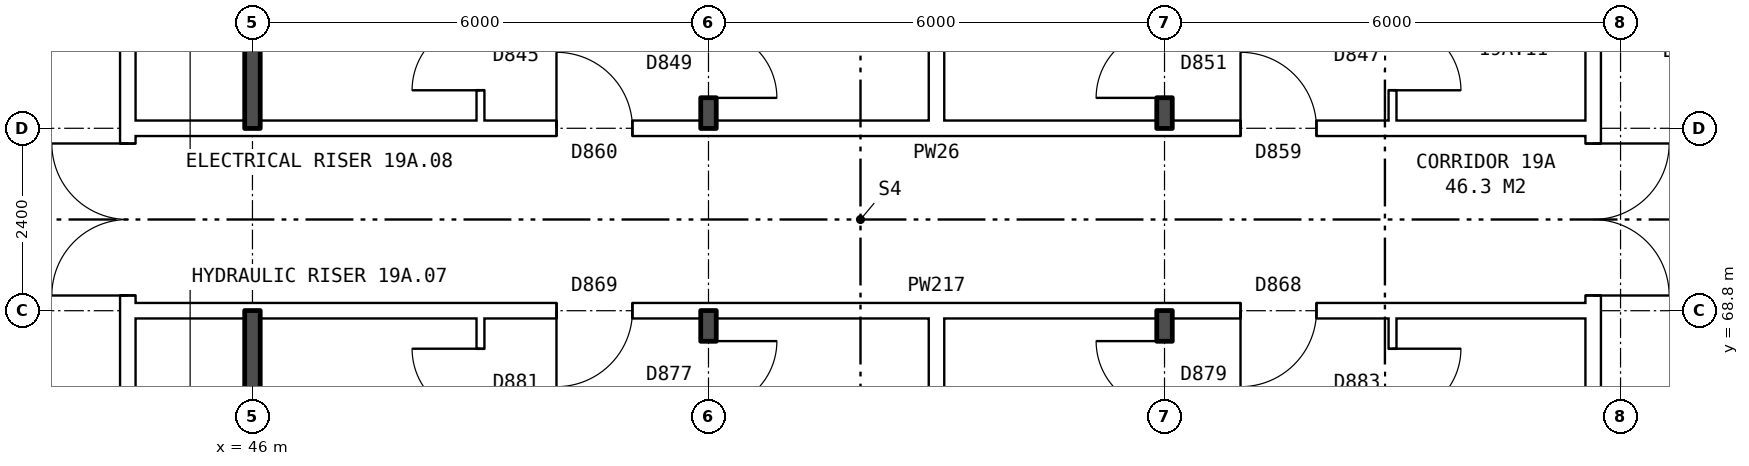
"""IFC4 building model, lengths in metres.
Left out: names, types, materials, properties, quantities, classifications, styles, units other than length and angle.
Written with IfcOpenShell. Run it as: python <this file> out.ifc"""

import sys

from ifc_helpers import new_model, si_unit, direction, frame, frame_2d, origin, place, context, subcontext, project, spatial, rectangle, extrude, element, fill, save


model = new_model("IFC4")
c1 = context("Model", 3, precision=1e-05, world=origin(), true_north=direction((0.0, 1.0)))
c2 = subcontext(c1, "Body", "Model", "MODEL_VIEW")
j1 = project(units=[si_unit("LENGTHUNIT", "METRE"), si_unit("PLANEANGLEUNIT", "RADIAN")], contexts=[c1])
p1 = place(None, origin())
s1 = spatial("IfcSite", under=j1, at=p1, CompositionType="ELEMENT")
p2 = place(p1, origin())
s2 = spatial("IfcBuilding", under=s1, at=p2, CompositionType="ELEMENT")
p3 = place(p2, frame((0.0, 0.0, 71.6)))
s3 = spatial("IfcBuildingStorey", under=s2, at=p3, CompositionType="ELEMENT", Elevation=71.6)
p4 = place(p3, frame((63.64, 63.9, 0.0), z_axis=(0.0, 0.0, 1.0), x_axis=(0.0, 1.0, 0.0)))
e1 = element("IfcWall", 1, at=p4, inside=s3, PredefinedType="PARTITIONING", context=c2, shape_type="SweptSolid", body=[
    extrude(rectangle(XDim=12.2, YDim=0.2, at=frame_2d((6.1, 0.0))), origin(), (0.0, 0.0, 1.0), 2.85),
])
p5 = place(p4, frame((5.1, 0.0, 0.0)))
e2 = element("IfcOpeningElement", 2, at=p5, cuts=e1, PredefinedType="OPENING", context=c2, shape_type="SweptSolid", body=[
    extrude(rectangle(XDim=2.0, YDim=2.1, at=frame_2d((1.0, 1.05))), frame((0.0, 0.11, 0.0), z_axis=(0.0, -1.0, 0.0), x_axis=(1.0, 0.0, 0.0)), (0.0, 0.0, 1.0), 0.22),
])
p6 = place(p3, frame((44.36, 63.9, 0.0), z_axis=(0.0, 0.0, 1.0), x_axis=(0.0, 1.0, 0.0)))
e3 = element("IfcWall", 3, at=p6, inside=s3, PredefinedType="PARTITIONING", context=c2, shape_type="SweptSolid", body=[
    extrude(rectangle(XDim=12.2, YDim=0.2, at=frame_2d((6.1, 0.0))), origin(), (0.0, 0.0, 1.0), 2.85),
])
p7 = place(p6, frame((5.1, 0.0, 0.0)))
e4 = element("IfcOpeningElement", 4, at=p7, cuts=e3, PredefinedType="OPENING", context=c2, shape_type="SweptSolid", body=[
    extrude(rectangle(XDim=2.0, YDim=2.1, at=frame_2d((1.0, 1.05))), frame((0.0, 0.11, 0.0), z_axis=(0.0, -1.0, 0.0), x_axis=(1.0, 0.0, 0.0)), (0.0, 0.0, 1.0), 0.22),
])
p8 = place(p3, frame((44.36, 68.8, 0.0), z_axis=(0.0, 0.0, 1.0), x_axis=(1.0, 0.0, 0.0)))
e5 = element("IfcWall", 5, at=p8, inside=s3, PredefinedType="PARTITIONING", context=c2, shape_type="SweptSolid", body=[
    extrude(rectangle(XDim=19.28, YDim=0.2, at=frame_2d((9.64, 0.0))), origin(), (0.0, 0.0, 1.0), 2.85),
])
p9 = place(p8, frame((14.64, 0.0, 0.0)))
e6 = element("IfcOpeningElement", 6, at=p9, cuts=e5, PredefinedType="OPENING", context=c2, shape_type="SweptSolid", body=[
    extrude(rectangle(XDim=1.0, YDim=2.1, at=frame_2d((0.5, 1.05))), frame((0.0, 0.11, 0.0), z_axis=(0.0, -1.0, 0.0), x_axis=(1.0, 0.0, 0.0)), (0.0, 0.0, 1.0), 0.22),
])
p10 = place(p8, frame((5.64, 0.0, 0.0)))
e7 = element("IfcOpeningElement", 7, at=p10, cuts=e5, PredefinedType="OPENING", context=c2, shape_type="SweptSolid", body=[
    extrude(rectangle(XDim=1.0, YDim=2.1, at=frame_2d((0.5, 1.05))), frame((0.0, 0.11, 0.0), z_axis=(0.0, -1.0, 0.0), x_axis=(1.0, 0.0, 0.0)), (0.0, 0.0, 1.0), 0.22),
])
p11 = place(p3, frame((44.36, 71.2, 0.0), z_axis=(0.0, 0.0, 1.0), x_axis=(1.0, 0.0, 0.0)))
e8 = element("IfcWall", 8, at=p11, inside=s3, PredefinedType="PARTITIONING", context=c2, shape_type="SweptSolid", body=[
    extrude(rectangle(XDim=19.28, YDim=0.2, at=frame_2d((9.64, 0.0))), origin(), (0.0, 0.0, 1.0), 2.85),
])
p12 = place(p11, frame((14.64, 0.0, 0.0)))
e9 = element("IfcOpeningElement", 9, at=p12, cuts=e8, PredefinedType="OPENING", context=c2, shape_type="SweptSolid", body=[
    extrude(rectangle(XDim=1.0, YDim=2.1, at=frame_2d((0.5, 1.05))), frame((0.0, 0.11, 0.0), z_axis=(0.0, -1.0, 0.0), x_axis=(1.0, 0.0, 0.0)), (0.0, 0.0, 1.0), 0.22),
])
p13 = place(p11, frame((5.64, 0.0, 0.0)))
e10 = element("IfcOpeningElement", 10, at=p13, cuts=e8, PredefinedType="OPENING", context=c2, shape_type="SweptSolid", body=[
    extrude(rectangle(XDim=1.0, YDim=2.1, at=frame_2d((0.5, 1.05))), frame((0.0, 0.11, 0.0), z_axis=(0.0, -1.0, 0.0), x_axis=(1.0, 0.0, 0.0)), (0.0, 0.0, 1.0), 0.22),
])
for number, where, z_axis, x_axis in (
    (11, (46.0, 63.8, 0.0), (0.0, 0.0, 1.0), (0.0, 1.0, 0.0)),
    (12, (46.0, 71.2, 0.0), (0.0, 0.0, 1.0), (0.0, 1.0, 0.0)),
):
    element("IfcWall", number, at=place(p3, frame(where, z_axis=z_axis, x_axis=x_axis)), inside=s3, PredefinedType="SOLIDWALL", context=c2, shape_type="SweptSolid", body=[
        extrude(rectangle(XDim=5.0, YDim=0.2, at=frame_2d((2.5, 0.0))), origin(), (0.0, 0.0, 1.0), 2.85),
    ])
p14 = place(p3, frame((49.0, 54.36, 0.0), z_axis=(0.0, 0.0, 1.0), x_axis=(0.0, 1.0, 0.0)))
e13 = element("IfcWall", 13, at=p14, inside=s3, PredefinedType="PARTITIONING", context=c2, shape_type="SweptSolid", body=[
    extrude(rectangle(XDim=14.34, YDim=0.1, at=frame_2d((7.17, 0.0))), origin(), (0.0, 0.0, 1.0), 2.85),
])
p15 = place(p14, frame((6.7, 0.0, 0.0)))
e14 = element("IfcOpeningElement", 14, at=p15, cuts=e13, PredefinedType="OPENING", context=c2, shape_type="SweptSolid", body=[
    extrude(rectangle(XDim=0.9, YDim=2.1, at=frame_2d((0.45, 1.05))), frame((0.0, 0.06, 0.0), z_axis=(0.0, -1.0, 0.0), x_axis=(1.0, 0.0, 0.0)), (0.0, 0.0, 1.0), 0.12),
])
p16 = place(p14, frame((13.04, 0.0, 0.0)))
e15 = element("IfcOpeningElement", 15, at=p16, cuts=e13, PredefinedType="OPENING", context=c2, shape_type="SweptSolid", body=[
    extrude(rectangle(XDim=0.9, YDim=2.1, at=frame_2d((0.45, 1.05))), frame((0.0, 0.06, 0.0), z_axis=(0.0, -1.0, 0.0), x_axis=(1.0, 0.0, 0.0)), (0.0, 0.0, 1.0), 0.12),
])
p17 = place(p3, frame((49.0, 71.3, 0.0), z_axis=(0.0, 0.0, 1.0), x_axis=(0.0, 1.0, 0.0)))
e16 = element("IfcWall", 16, at=p17, inside=s3, PredefinedType="PARTITIONING", context=c2, shape_type="SweptSolid", body=[
    extrude(rectangle(XDim=14.34, YDim=0.1, at=frame_2d((7.17, 0.0))), origin(), (0.0, 0.0, 1.0), 2.85),
])
p18 = place(p17, frame((5.74, 0.0, 0.0)))
e17 = element("IfcOpeningElement", 17, at=p18, cuts=e16, PredefinedType="OPENING", context=c2, shape_type="SweptSolid", body=[
    extrude(rectangle(XDim=0.9, YDim=2.1, at=frame_2d((0.45, 1.05))), frame((0.0, 0.06, 0.0), z_axis=(0.0, -1.0, 0.0), x_axis=(1.0, 0.0, 0.0)), (0.0, 0.0, 1.0), 0.12),
])
p19 = place(p17, frame((0.4, 0.0, 0.0)))
e18 = element("IfcOpeningElement", 18, at=p19, cuts=e16, PredefinedType="OPENING", context=c2, shape_type="SweptSolid", body=[
    extrude(rectangle(XDim=0.9, YDim=2.1, at=frame_2d((0.45, 1.05))), frame((0.0, 0.06, 0.0), z_axis=(0.0, -1.0, 0.0), x_axis=(1.0, 0.0, 0.0)), (0.0, 0.0, 1.0), 0.12),
])
p20 = place(p3, frame((52.0, 54.36, 0.0), z_axis=(0.0, 0.0, 1.0), x_axis=(0.0, 1.0, 0.0)))
e19 = element("IfcWall", 19, at=p20, inside=s3, PredefinedType="SOLIDWALL", context=c2, shape_type="SweptSolid", body=[
    extrude(rectangle(XDim=14.44, YDim=0.2, at=frame_2d((7.22, 0.0))), origin(), (0.0, 0.0, 1.0), 2.85),
])
p21 = place(p20, frame((6.7, 0.0, 0.0)))
e20 = element("IfcOpeningElement", 20, at=p21, cuts=e19, PredefinedType="OPENING", context=c2, shape_type="SweptSolid", body=[
    extrude(rectangle(XDim=0.9, YDim=2.1, at=frame_2d((0.45, 1.05))), frame((0.0, 0.11, 0.0), z_axis=(0.0, -1.0, 0.0), x_axis=(1.0, 0.0, 0.0)), (0.0, 0.0, 1.0), 0.22),
])
p22 = place(p20, frame((13.14, 0.0, 0.0)))
e21 = element("IfcOpeningElement", 21, at=p22, cuts=e19, PredefinedType="OPENING", context=c2, shape_type="SweptSolid", body=[
    extrude(rectangle(XDim=0.9, YDim=2.1, at=frame_2d((0.45, 1.05))), frame((0.0, 0.11, 0.0), z_axis=(0.0, -1.0, 0.0), x_axis=(1.0, 0.0, 0.0)), (0.0, 0.0, 1.0), 0.22),
])
p23 = place(p3, frame((52.0, 71.2, 0.0), z_axis=(0.0, 0.0, 1.0), x_axis=(0.0, 1.0, 0.0)))
e22 = element("IfcWall", 22, at=p23, inside=s3, PredefinedType="SOLIDWALL", context=c2, shape_type="SweptSolid", body=[
    extrude(rectangle(XDim=14.44, YDim=0.2, at=frame_2d((7.22, 0.0))), origin(), (0.0, 0.0, 1.0), 2.85),
])
p24 = place(p23, frame((5.84, 0.0, 0.0)))
e23 = element("IfcOpeningElement", 23, at=p24, cuts=e22, PredefinedType="OPENING", context=c2, shape_type="SweptSolid", body=[
    extrude(rectangle(XDim=0.9, YDim=2.1, at=frame_2d((0.45, 1.05))), frame((0.0, 0.11, 0.0), z_axis=(0.0, -1.0, 0.0), x_axis=(1.0, 0.0, 0.0)), (0.0, 0.0, 1.0), 0.22),
])
p25 = place(p23, frame((0.4, 0.0, 0.0)))
e24 = element("IfcOpeningElement", 24, at=p25, cuts=e22, PredefinedType="OPENING", context=c2, shape_type="SweptSolid", body=[
    extrude(rectangle(XDim=0.9, YDim=2.1, at=frame_2d((0.45, 1.05))), frame((0.0, 0.11, 0.0), z_axis=(0.0, -1.0, 0.0), x_axis=(1.0, 0.0, 0.0)), (0.0, 0.0, 1.0), 0.22),
])
for number, where, z_axis, x_axis in (
    (25, (55.0, 54.36, 0.0), (0.0, 0.0, 1.0), (0.0, 1.0, 0.0)),
    (26, (55.0, 71.3, 0.0), (0.0, 0.0, 1.0), (0.0, 1.0, 0.0)),
):
    element("IfcWall", number, at=place(p3, frame(where, z_axis=z_axis, x_axis=x_axis)), inside=s3, PredefinedType="PARTITIONING", context=c2, shape_type="SweptSolid", body=[
        extrude(rectangle(XDim=14.34, YDim=0.2, at=frame_2d((7.17, 0.0))), origin(), (0.0, 0.0, 1.0), 2.85),
    ])
p26 = place(p3, frame((58.0, 54.36, 0.0), z_axis=(0.0, 0.0, 1.0), x_axis=(0.0, 1.0, 0.0)))
e27 = element("IfcWall", 27, at=p26, inside=s3, PredefinedType="SOLIDWALL", context=c2, shape_type="SweptSolid", body=[
    extrude(rectangle(XDim=14.44, YDim=0.2, at=frame_2d((7.22, 0.0))), origin(), (0.0, 0.0, 1.0), 2.85),
])
p27 = place(p26, frame((7.7, 0.0, 0.0)))
e28 = element("IfcOpeningElement", 28, at=p27, cuts=e27, PredefinedType="OPENING", context=c2, shape_type="SweptSolid", body=[
    extrude(rectangle(XDim=0.9, YDim=2.1, at=frame_2d((0.45, 1.05))), frame((0.0, 0.11, 0.0), z_axis=(0.0, -1.0, 0.0), x_axis=(1.0, 0.0, 0.0)), (0.0, 0.0, 1.0), 0.22),
])
p28 = place(p26, frame((13.14, 0.0, 0.0)))
e29 = element("IfcOpeningElement", 29, at=p28, cuts=e27, PredefinedType="OPENING", context=c2, shape_type="SweptSolid", body=[
    extrude(rectangle(XDim=0.9, YDim=2.1, at=frame_2d((0.45, 1.05))), frame((0.0, 0.11, 0.0), z_axis=(0.0, -1.0, 0.0), x_axis=(1.0, 0.0, 0.0)), (0.0, 0.0, 1.0), 0.22),
])
p29 = place(p3, frame((58.0, 71.2, 0.0), z_axis=(0.0, 0.0, 1.0), x_axis=(0.0, 1.0, 0.0)))
e30 = element("IfcWall", 30, at=p29, inside=s3, PredefinedType="SOLIDWALL", context=c2, shape_type="SweptSolid", body=[
    extrude(rectangle(XDim=14.44, YDim=0.2, at=frame_2d((7.22, 0.0))), origin(), (0.0, 0.0, 1.0), 2.85),
])
p30 = place(p29, frame((8.04, 0.0, 0.0)))
e31 = element("IfcOpeningElement", 31, at=p30, cuts=e30, PredefinedType="OPENING", context=c2, shape_type="SweptSolid", body=[
    extrude(rectangle(XDim=0.9, YDim=2.1, at=frame_2d((0.45, 1.05))), frame((0.0, 0.11, 0.0), z_axis=(0.0, -1.0, 0.0), x_axis=(1.0, 0.0, 0.0)), (0.0, 0.0, 1.0), 0.22),
])
p31 = place(p29, frame((0.4, 0.0, 0.0)))
e32 = element("IfcOpeningElement", 32, at=p31, cuts=e30, PredefinedType="OPENING", context=c2, shape_type="SweptSolid", body=[
    extrude(rectangle(XDim=0.9, YDim=2.1, at=frame_2d((0.45, 1.05))), frame((0.0, 0.11, 0.0), z_axis=(0.0, -1.0, 0.0), x_axis=(1.0, 0.0, 0.0)), (0.0, 0.0, 1.0), 0.22),
])
p32 = place(p3, frame((61.0, 54.36, 0.0), z_axis=(0.0, 0.0, 1.0), x_axis=(0.0, 1.0, 0.0)))
e33 = element("IfcWall", 33, at=p32, inside=s3, PredefinedType="PARTITIONING", context=c2, shape_type="SweptSolid", body=[
    extrude(rectangle(XDim=14.34, YDim=0.1, at=frame_2d((7.17, 0.0))), origin(), (0.0, 0.0, 1.0), 2.85),
])
p33 = place(p32, frame((7.7, 0.0, 0.0)))
e34 = element("IfcOpeningElement", 34, at=p33, cuts=e33, PredefinedType="OPENING", context=c2, shape_type="SweptSolid", body=[
    extrude(rectangle(XDim=0.9, YDim=2.1, at=frame_2d((0.45, 1.05))), frame((0.0, 0.06, 0.0), z_axis=(0.0, -1.0, 0.0), x_axis=(1.0, 0.0, 0.0)), (0.0, 0.0, 1.0), 0.12),
])
p34 = place(p32, frame((13.04, 0.0, 0.0)))
e35 = element("IfcOpeningElement", 35, at=p34, cuts=e33, PredefinedType="OPENING", context=c2, shape_type="SweptSolid", body=[
    extrude(rectangle(XDim=0.9, YDim=2.1, at=frame_2d((0.45, 1.05))), frame((0.0, 0.06, 0.0), z_axis=(0.0, -1.0, 0.0), x_axis=(1.0, 0.0, 0.0)), (0.0, 0.0, 1.0), 0.12),
])
p35 = place(p3, frame((61.0, 71.3, 0.0), z_axis=(0.0, 0.0, 1.0), x_axis=(0.0, 1.0, 0.0)))
e36 = element("IfcWall", 36, at=p35, inside=s3, PredefinedType="PARTITIONING", context=c2, shape_type="SweptSolid", body=[
    extrude(rectangle(XDim=14.34, YDim=0.1, at=frame_2d((7.17, 0.0))), origin(), (0.0, 0.0, 1.0), 2.85),
])
p36 = place(p35, frame((7.94, 0.0, 0.0)))
e37 = element("IfcOpeningElement", 37, at=p36, cuts=e36, PredefinedType="OPENING", context=c2, shape_type="SweptSolid", body=[
    extrude(rectangle(XDim=0.9, YDim=2.1, at=frame_2d((0.45, 1.05))), frame((0.0, 0.06, 0.0), z_axis=(0.0, -1.0, 0.0), x_axis=(1.0, 0.0, 0.0)), (0.0, 0.0, 1.0), 0.12),
])
p37 = place(p35, frame((0.4, 0.0, 0.0)))
e38 = element("IfcOpeningElement", 38, at=p37, cuts=e36, PredefinedType="OPENING", context=c2, shape_type="SweptSolid", body=[
    extrude(rectangle(XDim=0.9, YDim=2.1, at=frame_2d((0.45, 1.05))), frame((0.0, 0.06, 0.0), z_axis=(0.0, -1.0, 0.0), x_axis=(1.0, 0.0, 0.0)), (0.0, 0.0, 1.0), 0.12),
])
p38 = place(p5, frame((2.0, 0.0, 0.0), z_axis=(0.0, 0.0, 1.0), x_axis=(-1.0, 0.0, 0.0)))
e39 = element("IfcDoor", 39, at=p38, inside=s3, OperationType="DOUBLE_DOOR_SINGLE_SWING", PredefinedType="DOOR", context=c2, shape_type="SweptSolid", body=[
    extrude(rectangle(XDim=2.0, YDim=2.1, at=frame_2d((1.0, 1.05))), frame((0.0, 0.025, 0.0), z_axis=(0.0, -1.0, 0.0), x_axis=(1.0, 0.0, 0.0)), (0.0, 0.0, 1.0), 0.05),
])
fill(e2, e39)
p39 = place(p7, origin())
e40 = element("IfcDoor", 40, at=p39, inside=s3, OperationType="DOUBLE_DOOR_SINGLE_SWING", PredefinedType="DOOR", context=c2, shape_type="SweptSolid", body=[
    extrude(rectangle(XDim=2.0, YDim=2.1, at=frame_2d((1.0, 1.05))), frame((0.0, 0.025, 0.0), z_axis=(0.0, -1.0, 0.0), x_axis=(1.0, 0.0, 0.0)), (0.0, 0.0, 1.0), 0.05),
])
fill(e4, e40)
p40 = place(p9, frame((1.0, 0.0, 0.0), z_axis=(0.0, 0.0, 1.0), x_axis=(-1.0, 0.0, 0.0)))
e41 = element("IfcDoor", 41, at=p40, inside=s3, OperationType="SINGLE_SWING_RIGHT", PredefinedType="DOOR", context=c2, shape_type="SweptSolid", body=[
    extrude(rectangle(XDim=1.0, YDim=2.1, at=frame_2d((0.5, 1.05))), frame((0.0, 0.025, 0.0), z_axis=(0.0, -1.0, 0.0), x_axis=(1.0, 0.0, 0.0)), (0.0, 0.0, 1.0), 0.05),
])
fill(e6, e41)
p41 = place(p34, frame((0.9, 0.0, 0.0), z_axis=(0.0, 0.0, 1.0), x_axis=(-1.0, 0.0, 0.0)))
e42 = element("IfcDoor", 42, at=p41, inside=s3, OperationType="SINGLE_SWING_LEFT", PredefinedType="DOOR", context=c2, shape_type="SweptSolid", body=[
    extrude(rectangle(XDim=0.9, YDim=2.1, at=frame_2d((0.45, 1.05))), frame((0.0, 0.025, 0.0), z_axis=(0.0, -1.0, 0.0), x_axis=(1.0, 0.0, 0.0)), (0.0, 0.0, 1.0), 0.05),
])
fill(e35, e42)
p42 = place(p28, origin())
e43 = element("IfcDoor", 43, at=p42, inside=s3, OperationType="SINGLE_SWING_RIGHT", PredefinedType="DOOR", context=c2, shape_type="SweptSolid", body=[
    extrude(rectangle(XDim=0.9, YDim=2.1, at=frame_2d((0.45, 1.05))), frame((0.0, 0.025, 0.0), z_axis=(0.0, -1.0, 0.0), x_axis=(1.0, 0.0, 0.0)), (0.0, 0.0, 1.0), 0.05),
])
fill(e29, e43)
p43 = place(p10, frame((1.0, 0.0, 0.0), z_axis=(0.0, 0.0, 1.0), x_axis=(-1.0, 0.0, 0.0)))
e44 = element("IfcDoor", 44, at=p43, inside=s3, OperationType="SINGLE_SWING_RIGHT", PredefinedType="DOOR", context=c2, shape_type="SweptSolid", body=[
    extrude(rectangle(XDim=1.0, YDim=2.1, at=frame_2d((0.5, 1.05))), frame((0.0, 0.025, 0.0), z_axis=(0.0, -1.0, 0.0), x_axis=(1.0, 0.0, 0.0)), (0.0, 0.0, 1.0), 0.05),
])
fill(e7, e44)
p44 = place(p22, frame((0.9, 0.0, 0.0), z_axis=(0.0, 0.0, 1.0), x_axis=(-1.0, 0.0, 0.0)))
e45 = element("IfcDoor", 45, at=p44, inside=s3, OperationType="SINGLE_SWING_LEFT", PredefinedType="DOOR", context=c2, shape_type="SweptSolid", body=[
    extrude(rectangle(XDim=0.9, YDim=2.1, at=frame_2d((0.45, 1.05))), frame((0.0, 0.025, 0.0), z_axis=(0.0, -1.0, 0.0), x_axis=(1.0, 0.0, 0.0)), (0.0, 0.0, 1.0), 0.05),
])
fill(e21, e45)
p45 = place(p16, origin())
e46 = element("IfcDoor", 46, at=p45, inside=s3, OperationType="SINGLE_SWING_RIGHT", PredefinedType="DOOR", context=c2, shape_type="SweptSolid", body=[
    extrude(rectangle(XDim=0.9, YDim=2.1, at=frame_2d((0.45, 1.05))), frame((0.0, 0.025, 0.0), z_axis=(0.0, -1.0, 0.0), x_axis=(1.0, 0.0, 0.0)), (0.0, 0.0, 1.0), 0.05),
])
fill(e15, e46)
p46 = place(p12, origin())
e47 = element("IfcDoor", 47, at=p46, inside=s3, OperationType="SINGLE_SWING_LEFT", PredefinedType="DOOR", context=c2, shape_type="SweptSolid", body=[
    extrude(rectangle(XDim=1.0, YDim=2.1, at=frame_2d((0.5, 1.05))), frame((0.0, 0.025, 0.0), z_axis=(0.0, -1.0, 0.0), x_axis=(1.0, 0.0, 0.0)), (0.0, 0.0, 1.0), 0.05),
])
fill(e9, e47)
p47 = place(p37, frame((0.9, 0.0, 0.0), z_axis=(0.0, 0.0, 1.0), x_axis=(-1.0, 0.0, 0.0)))
e48 = element("IfcDoor", 48, at=p47, inside=s3, OperationType="SINGLE_SWING_RIGHT", PredefinedType="DOOR", context=c2, shape_type="SweptSolid", body=[
    extrude(rectangle(XDim=0.9, YDim=2.1, at=frame_2d((0.45, 1.05))), frame((0.0, 0.025, 0.0), z_axis=(0.0, -1.0, 0.0), x_axis=(1.0, 0.0, 0.0)), (0.0, 0.0, 1.0), 0.05),
])
fill(e38, e48)
p48 = place(p31, origin())
e49 = element("IfcDoor", 49, at=p48, inside=s3, OperationType="SINGLE_SWING_LEFT", PredefinedType="DOOR", context=c2, shape_type="SweptSolid", body=[
    extrude(rectangle(XDim=0.9, YDim=2.1, at=frame_2d((0.45, 1.05))), frame((0.0, 0.025, 0.0), z_axis=(0.0, -1.0, 0.0), x_axis=(1.0, 0.0, 0.0)), (0.0, 0.0, 1.0), 0.05),
])
fill(e32, e49)
p49 = place(p13, origin())
e50 = element("IfcDoor", 50, at=p49, inside=s3, OperationType="SINGLE_SWING_LEFT", PredefinedType="DOOR", context=c2, shape_type="SweptSolid", body=[
    extrude(rectangle(XDim=1.0, YDim=2.1, at=frame_2d((0.5, 1.05))), frame((0.0, 0.025, 0.0), z_axis=(0.0, -1.0, 0.0), x_axis=(1.0, 0.0, 0.0)), (0.0, 0.0, 1.0), 0.05),
])
fill(e10, e50)
p50 = place(p25, frame((0.9, 0.0, 0.0), z_axis=(0.0, 0.0, 1.0), x_axis=(-1.0, 0.0, 0.0)))
e51 = element("IfcDoor", 51, at=p50, inside=s3, OperationType="SINGLE_SWING_RIGHT", PredefinedType="DOOR", context=c2, shape_type="SweptSolid", body=[
    extrude(rectangle(XDim=0.9, YDim=2.1, at=frame_2d((0.45, 1.05))), frame((0.0, 0.025, 0.0), z_axis=(0.0, -1.0, 0.0), x_axis=(1.0, 0.0, 0.0)), (0.0, 0.0, 1.0), 0.05),
])
fill(e24, e51)
p51 = place(p19, origin())
e52 = element("IfcDoor", 52, at=p51, inside=s3, OperationType="SINGLE_SWING_LEFT", PredefinedType="DOOR", context=c2, shape_type="SweptSolid", body=[
    extrude(rectangle(XDim=0.9, YDim=2.1, at=frame_2d((0.45, 1.05))), frame((0.0, 0.025, 0.0), z_axis=(0.0, -1.0, 0.0), x_axis=(1.0, 0.0, 0.0)), (0.0, 0.0, 1.0), 0.05),
])
fill(e18, e52)
save(model, sys.argv[1])
